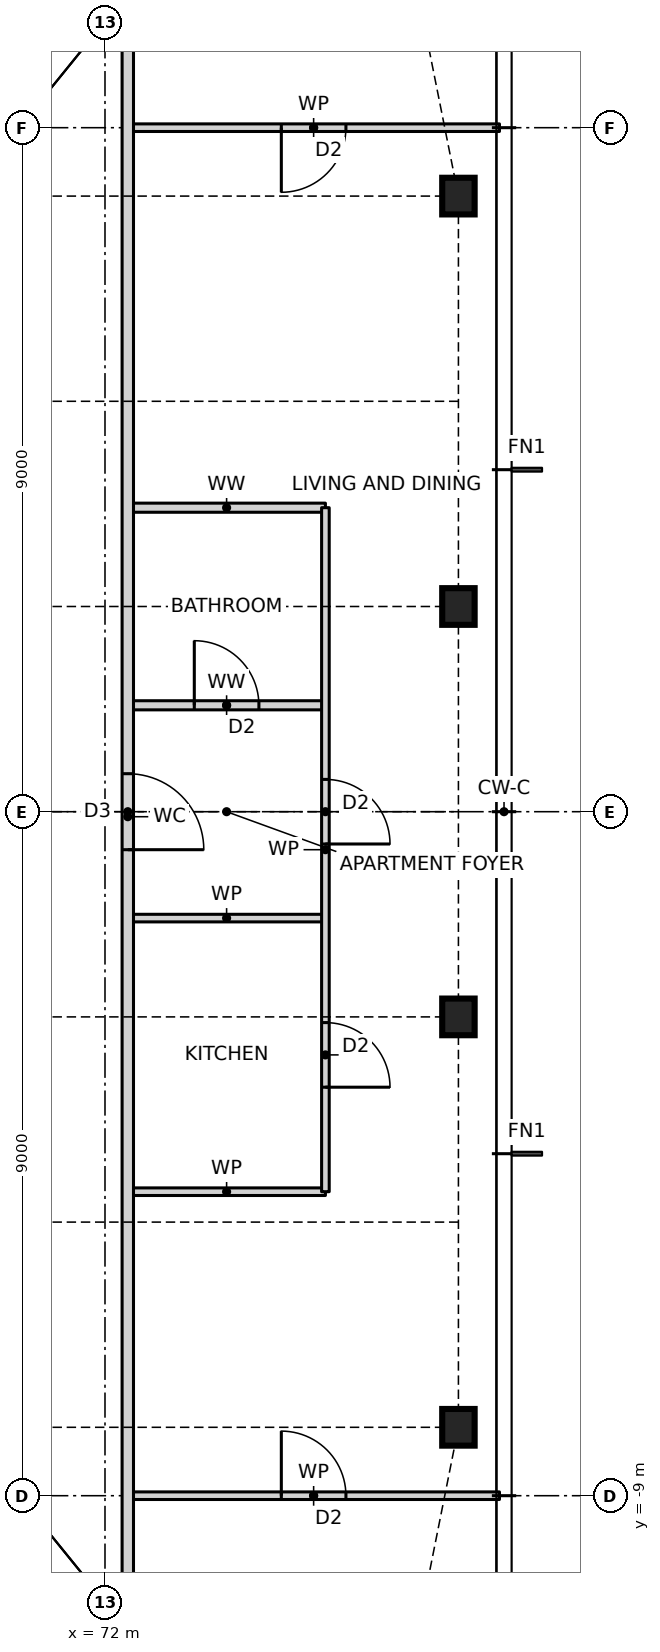
"""IFC4 building model, lengths in metres.
Left out: names, types, materials, properties, quantities, classifications, styles, units other than length and angle.
Written with IfcOpenShell. Run it as: python <this file> out.ifc"""

import sys

from ifc_helpers import new_model, si_unit, direction, frame, frame_2d, origin, origin_2d, place, context, subcontext, project, spatial, rectangle, i_section, extrude, element, fill, save


model = new_model("IFC4")
c1 = context("Model", 3, precision=1e-05, world=origin(), true_north=direction((0.0, 1.0)))
c2 = subcontext(c1, "Body", "Model", "MODEL_VIEW")
j1 = project(units=[si_unit("LENGTHUNIT", "METRE"), si_unit("PLANEANGLEUNIT", "RADIAN")], contexts=[c1])
p1 = place(None, origin())
s1 = spatial("IfcSite", under=j1, at=p1, CompositionType="ELEMENT")
p2 = place(p1, origin())
s2 = spatial("IfcBuilding", under=s1, at=p2, CompositionType="ELEMENT")
p3 = place(p2, frame((0.0, 0.0, 84.0)))
s3 = spatial("IfcBuildingStorey", under=s2, at=p3, CompositionType="ELEMENT", Elevation=84.0)
for number, where, z_axis, x_axis in (
    (1, (76.65, -8.1, 0.0), (0.0, 0.0, 1.0), (1.0, 0.0, 0.0)),
    (2, (76.65, -2.7, 0.0), (0.0, 0.0, 1.0), (1.0, 0.0, 0.0)),
    (3, (76.65, 2.7, 0.0), (0.0, 0.0, 1.0), (1.0, 0.0, 0.0)),
    (4, (76.65, 8.1, 0.0), (0.0, 0.0, 1.0), (1.0, 0.0, 0.0)),
):
    element("IfcColumn", number, at=place(p3, frame(where, z_axis=z_axis, x_axis=x_axis)), inside=s3, PredefinedType="COLUMN", context=c2, shape_type="SweptSolid", body=[
        extrude(i_section(OverallWidth=0.427, OverallDepth=0.483, WebThickness=0.051, FlangeThickness=0.082, at=origin_2d()), origin(), (0.0, 0.0, 1.0), 3.5),
    ])
p4 = place(p3, frame((72.3, -9.0, 0.0), z_axis=(0.0, 0.0, 1.0), x_axis=(1.0, 0.0, 0.0)))
e5 = element("IfcWall", 5, at=p4, inside=s3, PredefinedType="PARTITIONING", context=c2, shape_type="SweptSolid", body=[
    extrude(rectangle(XDim=4.89, YDim=0.1, at=frame_2d((2.445, 0.0))), origin(), (0.0, 0.0, 1.0), 3.27),
])
p5 = place(p4, frame((2.02, 0.0, 0.0)))
e6 = element("IfcOpeningElement", 6, at=p5, cuts=e5, PredefinedType="OPENING", context=c2, shape_type="SweptSolid", body=[
    extrude(rectangle(XDim=0.85, YDim=2.1, at=frame_2d((0.425, 1.05))), frame((0.0, 0.06, 0.0), z_axis=(0.0, -1.0, 0.0), x_axis=(1.0, 0.0, 0.0)), (0.0, 0.0, 1.0), 0.12),
])
for number, where, z_axis, x_axis in (
    (7, (72.3, -5.0, 0.0), (0.0, 0.0, 1.0), (1.0, 0.0, 0.0)),
    (8, (72.3, -1.4, 0.0), (0.0, 0.0, 1.0), (1.0, 0.0, 0.0)),
):
    element("IfcWall", number, at=place(p3, frame(where, z_axis=z_axis, x_axis=x_axis)), inside=s3, PredefinedType="PARTITIONING", context=c2, shape_type="SweptSolid", body=[
        extrude(rectangle(XDim=2.6, YDim=0.1, at=frame_2d((1.3, 0.0))), origin(), (0.0, 0.0, 1.0), 3.27),
    ])
p6 = place(p3, frame((72.3, 1.4, 0.0), z_axis=(0.0, 0.0, 1.0), x_axis=(1.0, 0.0, 0.0)))
e9 = element("IfcWall", 9, at=p6, inside=s3, PredefinedType="PARTITIONING", context=c2, shape_type="SweptSolid", body=[
    extrude(rectangle(XDim=2.6, YDim=0.12, at=frame_2d((1.3, 0.0))), origin(), (0.0, 0.0, 1.0), 3.27),
])
p7 = place(p6, frame((0.875, 0.0, 0.0)))
e10 = element("IfcOpeningElement", 10, at=p7, cuts=e9, PredefinedType="OPENING", context=c2, shape_type="SweptSolid", body=[
    extrude(rectangle(XDim=0.85, YDim=2.1, at=frame_2d((0.425, 1.05))), frame((0.0, 0.07, 0.0), z_axis=(0.0, -1.0, 0.0), x_axis=(1.0, 0.0, 0.0)), (0.0, 0.0, 1.0), 0.14),
])
p8 = place(p3, frame((72.3, 4.0, 0.0), z_axis=(0.0, 0.0, 1.0), x_axis=(1.0, 0.0, 0.0)))
e11 = element("IfcWall", 11, at=p8, inside=s3, PredefinedType="PARTITIONING", context=c2, shape_type="SweptSolid", body=[
    extrude(rectangle(XDim=2.6, YDim=0.12, at=frame_2d((1.3, 0.0))), origin(), (0.0, 0.0, 1.0), 3.27),
])
p9 = place(p3, frame((72.3, 9.0, 0.0), z_axis=(0.0, 0.0, 1.0), x_axis=(1.0, 0.0, 0.0)))
e12 = element("IfcWall", 12, at=p9, inside=s3, PredefinedType="PARTITIONING", context=c2, shape_type="SweptSolid", body=[
    extrude(rectangle(XDim=4.89, YDim=0.1, at=frame_2d((2.445, 0.0))), origin(), (0.0, 0.0, 1.0), 3.27),
])
p10 = place(p9, frame((2.02, 0.0, 0.0)))
e13 = element("IfcOpeningElement", 13, at=p10, cuts=e12, PredefinedType="OPENING", context=c2, shape_type="SweptSolid", body=[
    extrude(rectangle(XDim=0.85, YDim=2.1, at=frame_2d((0.425, 1.05))), frame((0.0, 0.06, 0.0), z_axis=(0.0, -1.0, 0.0), x_axis=(1.0, 0.0, 0.0)), (0.0, 0.0, 1.0), 0.12),
])
p11 = place(p3, frame((74.9, -5.0, 0.0), z_axis=(0.0, 0.0, 1.0), x_axis=(0.0, 1.0, 0.0)))
e14 = element("IfcWall", 14, at=p11, inside=s3, PredefinedType="PARTITIONING", context=c2, shape_type="SweptSolid", body=[
    extrude(rectangle(XDim=9.0, YDim=0.1, at=frame_2d((4.5, 0.0))), origin(), (0.0, 0.0, 1.0), 3.27),
])
p12 = place(p11, frame((1.375, 0.0, 0.0)))
e15 = element("IfcOpeningElement", 15, at=p12, cuts=e14, PredefinedType="OPENING", context=c2, shape_type="SweptSolid", body=[
    extrude(rectangle(XDim=0.85, YDim=2.1, at=frame_2d((0.425, 1.05))), frame((0.0, 0.06, 0.0), z_axis=(0.0, -1.0, 0.0), x_axis=(1.0, 0.0, 0.0)), (0.0, 0.0, 1.0), 0.12),
])
p13 = place(p11, frame((4.575, 0.0, 0.0)))
e16 = element("IfcOpeningElement", 16, at=p13, cuts=e14, PredefinedType="OPENING", context=c2, shape_type="SweptSolid", body=[
    extrude(rectangle(XDim=0.85, YDim=2.1, at=frame_2d((0.425, 1.05))), frame((0.0, 0.06, 0.0), z_axis=(0.0, -1.0, 0.0), x_axis=(1.0, 0.0, 0.0)), (0.0, 0.0, 1.0), 0.12),
])
p14 = place(p3, frame((72.3, -10.9, 0.0), z_axis=(0.0, 0.0, 1.0), x_axis=(0.0, 1.0, 0.0)))
e17 = element("IfcWall", 17, at=p14, inside=s3, PredefinedType="PARTITIONING", context=c2, shape_type="SweptSolid", body=[
    extrude(rectangle(XDim=21.668, YDim=0.15, at=frame_2d((10.834, 0.0))), origin(), (0.0, 0.0, 1.0), 3.27),
])
p15 = place(p14, frame((10.4, 0.0, 0.0)))
e18 = element("IfcOpeningElement", 18, at=p15, cuts=e17, PredefinedType="OPENING", context=c2, shape_type="SweptSolid", body=[
    extrude(rectangle(XDim=1.0, YDim=2.1, at=frame_2d((0.5, 1.05))), frame((0.0, 0.085, 0.0), z_axis=(0.0, -1.0, 0.0), x_axis=(1.0, 0.0, 0.0)), (0.0, 0.0, 1.0), 0.17),
])
p16 = place(p12, frame((0.85, 0.0, 0.0), z_axis=(0.0, 0.0, 1.0), x_axis=(-1.0, 0.0, 0.0)))
e19 = element("IfcDoor", 19, at=p16, inside=s3, OperationType="SINGLE_SWING_RIGHT", PredefinedType="DOOR", context=c2, shape_type="SweptSolid", body=[
    extrude(rectangle(XDim=0.85, YDim=2.1, at=frame_2d((0.425, 1.05))), frame((0.0, 0.025, 0.0), z_axis=(0.0, -1.0, 0.0), x_axis=(1.0, 0.0, 0.0)), (0.0, 0.0, 1.0), 0.05),
])
fill(e15, e19)
p17 = place(p15, frame((1.0, 0.0, 0.0), z_axis=(0.0, 0.0, 1.0), x_axis=(-1.0, 0.0, 0.0)))
e20 = element("IfcDoor", 20, at=p17, inside=s3, OperationType="SINGLE_SWING_RIGHT", PredefinedType="DOOR", context=c2, shape_type="SweptSolid", body=[
    extrude(rectangle(XDim=1.0, YDim=2.1, at=frame_2d((0.5, 1.05))), frame((0.0, 0.025, 0.0), z_axis=(0.0, -1.0, 0.0), x_axis=(1.0, 0.0, 0.0)), (0.0, 0.0, 1.0), 0.05),
])
fill(e18, e20)
p18 = place(p13, frame((0.85, 0.0, 0.0), z_axis=(0.0, 0.0, 1.0), x_axis=(-1.0, 0.0, 0.0)))
e21 = element("IfcDoor", 21, at=p18, inside=s3, OperationType="SINGLE_SWING_RIGHT", PredefinedType="DOOR", context=c2, shape_type="SweptSolid", body=[
    extrude(rectangle(XDim=0.85, YDim=2.1, at=frame_2d((0.425, 1.05))), frame((0.0, 0.025, 0.0), z_axis=(0.0, -1.0, 0.0), x_axis=(1.0, 0.0, 0.0)), (0.0, 0.0, 1.0), 0.05),
])
fill(e16, e21)
p19 = place(p7, origin())
e22 = element("IfcDoor", 22, at=p19, inside=s3, OperationType="SINGLE_SWING_LEFT", PredefinedType="DOOR", context=c2, shape_type="SweptSolid", body=[
    extrude(rectangle(XDim=0.85, YDim=2.1, at=frame_2d((0.425, 1.05))), frame((0.0, 0.025, 0.0), z_axis=(0.0, -1.0, 0.0), x_axis=(1.0, 0.0, 0.0)), (0.0, 0.0, 1.0), 0.05),
])
fill(e10, e22)
p20 = place(p5, origin())
e23 = element("IfcDoor", 23, at=p20, inside=s3, OperationType="SINGLE_SWING_LEFT", PredefinedType="DOOR", context=c2, shape_type="SweptSolid", body=[
    extrude(rectangle(XDim=0.85, YDim=2.1, at=frame_2d((0.425, 1.05))), frame((0.0, 0.025, 0.0), z_axis=(0.0, -1.0, 0.0), x_axis=(1.0, 0.0, 0.0)), (0.0, 0.0, 1.0), 0.05),
])
fill(e6, e23)
p21 = place(p10, frame((0.85, 0.0, 0.0), z_axis=(0.0, 0.0, 1.0), x_axis=(-1.0, 0.0, 0.0)))
e24 = element("IfcDoor", 24, at=p21, inside=s3, OperationType="SINGLE_SWING_RIGHT", PredefinedType="DOOR", context=c2, shape_type="SweptSolid", body=[
    extrude(rectangle(XDim=0.85, YDim=2.1, at=frame_2d((0.425, 1.05))), frame((0.0, 0.025, 0.0), z_axis=(0.0, -1.0, 0.0), x_axis=(1.0, 0.0, 0.0)), (0.0, 0.0, 1.0), 0.05),
])
fill(e13, e24)
save(model, sys.argv[1])
